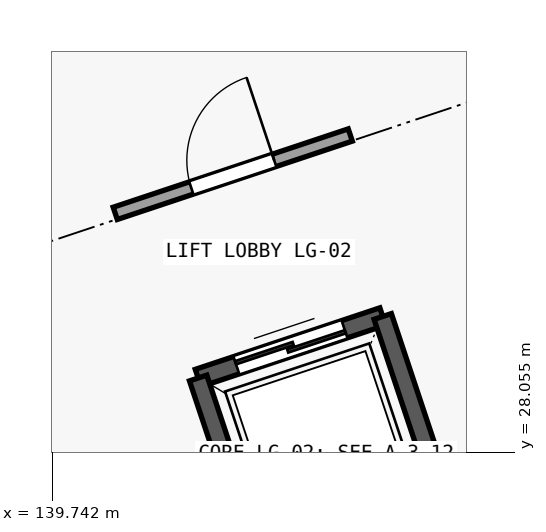
"""IFC4 building model, lengths in metres.
Left out: names, types, materials, properties, quantities, classifications, styles, units other than length and angle.
Written with IfcOpenShell. Run it as: python <this file> out.ifc"""

import sys

from ifc_helpers import new_model, si_unit, direction, frame, frame_2d, origin, place, context, subcontext, project, spatial, rectangle, extrude, element, fill, save


model = new_model("IFC4")
c1 = context("Model", 3, precision=1e-05, world=origin(), true_north=direction((0.0, 1.0)))
c2 = subcontext(c1, "Body", "Model", "MODEL_VIEW")
j1 = project(units=[si_unit("LENGTHUNIT", "METRE"), si_unit("PLANEANGLEUNIT", "RADIAN")], contexts=[c1])
p1 = place(None, origin())
s1 = spatial("IfcSite", under=j1, at=p1, CompositionType="ELEMENT")
p2 = place(p1, origin())
s2 = spatial("IfcBuilding", under=s1, at=p2, CompositionType="ELEMENT")
p3 = place(p2, frame((0.0, 0.0, -4.2)))
s3 = spatial("IfcBuildingStorey", under=s2, at=p3, CompositionType="ELEMENT", Elevation=-4.2)
p4 = place(p3, frame((141.664, 29.032, 0.0), z_axis=(0.0, 0.0, 1.0), x_axis=(0.948673760334, 0.316256377729, 0.0)))
e1 = element("IfcWall", 1, at=p4, inside=s3, PredefinedType="SOLIDWALL", context=c2, shape_type="SweptSolid", body=[
    extrude(rectangle(XDim=2.56, YDim=0.24, at=frame_2d((1.28, 0.0))), origin(), (0.0, 0.0, 1.0), 3.8),
])
p5 = place(p4, frame((0.53, 0.0, 0.0)))
e2 = element("IfcOpeningElement", 2, at=p5, cuts=e1, PredefinedType="OPENING", context=c2, shape_type="SweptSolid", body=[
    extrude(rectangle(XDim=1.5, YDim=2.25, at=frame_2d((0.75, 1.125))), frame((0.0, 0.13, 0.0), z_axis=(0.0, -1.0, 0.0), x_axis=(1.0, 0.0, 0.0)), (0.0, 0.0, 1.0), 0.26),
])
for number, where, z_axis, x_axis in (
    (3, (142.6, 26.224, 0.0), (0.0, 0.0, 1.0), (-0.316, 0.949, 0.0)),
    (4, (144.093, 29.842, 0.0), (0.0, 0.0, 1.0), (0.316, -0.949, 0.0)),
):
    element("IfcWall", number, at=place(p3, frame(where, z_axis=z_axis, x_axis=x_axis)), inside=s3, PredefinedType="SOLIDWALL", context=c2, shape_type="SweptSolid", body=[
        extrude(rectangle(XDim=2.96, YDim=0.24, at=frame_2d((1.48, 0.0))), origin(), (0.0, 0.0, 1.0), 3.8),
    ])
p6 = place(p3, frame((140.573, 31.198, 0.0), z_axis=(0.0, 0.0, 1.0), x_axis=(0.948698274856, 0.316182832053, 0.0)))
e5 = element("IfcWall", 5, at=p6, inside=s3, PredefinedType="PARTITIONING", context=c2, shape_type="SweptSolid", body=[
    extrude(rectangle(XDim=3.26, YDim=0.17, at=frame_2d((1.63, 0.0))), origin(), (0.0, 0.0, 1.0), 3.8),
])
p7 = place(p6, frame((1.055, 0.0, 0.0)))
e6 = element("IfcOpeningElement", 6, at=p7, cuts=e5, PredefinedType="OPENING", context=c2, shape_type="SweptSolid", body=[
    extrude(rectangle(XDim=1.15, YDim=2.15, at=frame_2d((0.575, 1.075))), frame((0.0, 0.095, 0.0), z_axis=(0.0, -1.0, 0.0), x_axis=(1.0, 0.0, 0.0)), (0.0, 0.0, 1.0), 0.19),
])
p8 = place(p5, origin())
e7 = element("IfcDoor", 7, at=p8, inside=s3, OperationType="DOUBLE_DOOR_SLIDING", PredefinedType="DOOR", context=c2, shape_type="SweptSolid", body=[
    extrude(rectangle(XDim=1.5, YDim=2.25, at=frame_2d((0.75, 1.125))), frame((0.0, 0.025, 0.0), z_axis=(0.0, -1.0, 0.0), x_axis=(1.0, 0.0, 0.0)), (0.0, 0.0, 1.0), 0.05),
])
fill(e2, e7)
p9 = place(p7, origin())
e8 = element("IfcDoor", 8, at=p9, inside=s3, OperationType="SINGLE_SWING_RIGHT", PredefinedType="DOOR", context=c2, shape_type="SweptSolid", body=[
    extrude(rectangle(XDim=1.15, YDim=2.15, at=frame_2d((0.575, 1.075))), frame((0.0, 0.025, 0.0), z_axis=(0.0, -1.0, 0.0), x_axis=(1.0, 0.0, 0.0)), (0.0, 0.0, 1.0), 0.05),
])
fill(e6, e8)
save(model, sys.argv[1])
